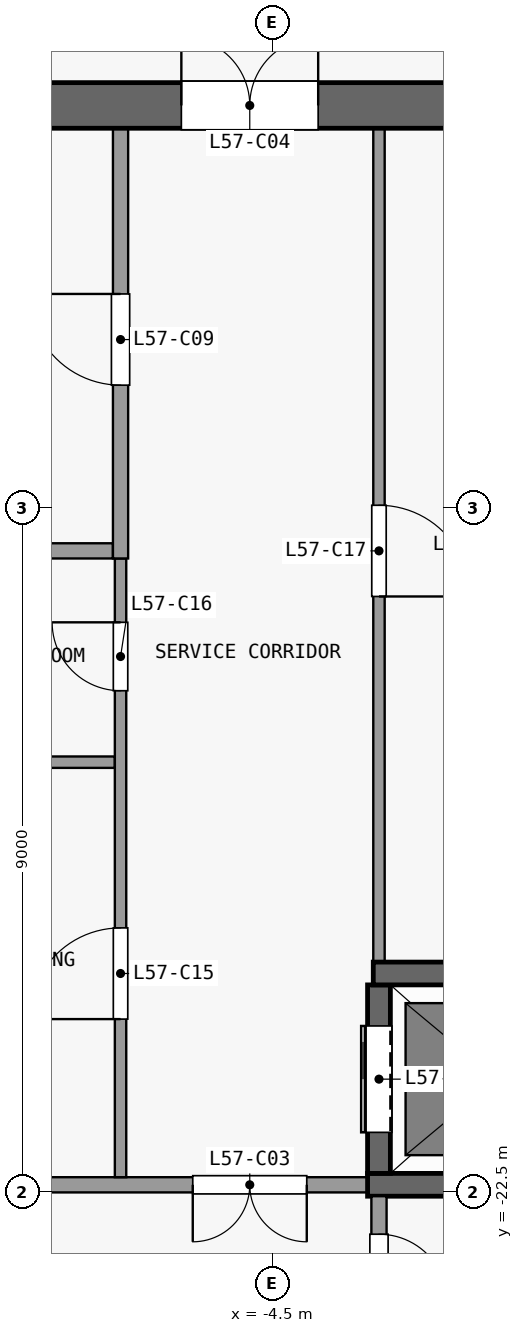
"""IFC4 building model, lengths in metres.
Left out: names, types, materials, properties, quantities, classifications, styles, units other than length and angle.
Written with IfcOpenShell. Run it as: python <this file> out.ifc"""

import sys

from ifc_helpers import new_model, si_unit, direction, frame, frame_2d, origin, place, context, subcontext, project, spatial, rectangle, extrude, element, fill, save


model = new_model("IFC4")
c1 = context("Model", 3, precision=1e-05, world=origin(), true_north=direction((0.0, 1.0)))
c2 = subcontext(c1, "Body", "Model", "MODEL_VIEW")
j1 = project(units=[si_unit("LENGTHUNIT", "METRE"), si_unit("PLANEANGLEUNIT", "RADIAN")], contexts=[c1])
p1 = place(None, origin())
s1 = spatial("IfcSite", under=j1, at=p1, CompositionType="ELEMENT")
p2 = place(p1, origin())
s2 = spatial("IfcBuilding", under=s1, at=p2, CompositionType="ELEMENT")
p3 = place(p2, frame((0.0, 0.0, 226.7)))
s3 = spatial("IfcBuildingStorey", under=s2, at=p3, CompositionType="ELEMENT", Elevation=226.7)
p4 = place(p3, frame((-13.2, -8.2, 0.0), z_axis=(0.0, 0.0, 1.0), x_axis=(1.0, 0.0, 0.0)))
e1 = element("IfcWall", 1, at=p4, inside=s3, PredefinedType="SHEAR", context=c2, shape_type="SweptSolid", body=[
    extrude(rectangle(XDim=26.4, YDim=0.6, at=frame_2d((13.2, 0.0))), origin(), (0.0, 0.0, 1.0), 3.3),
])
p5 = place(p4, frame((7.5, 0.0, 0.0)))
e2 = element("IfcOpeningElement", 2, at=p5, cuts=e1, PredefinedType="OPENING", context=c2, shape_type="SweptSolid", body=[
    extrude(rectangle(XDim=1.8, YDim=2.1, at=frame_2d((0.9, 1.05))), frame((0.0, 0.31, 0.0), z_axis=(0.0, -1.0, 0.0), x_axis=(1.0, 0.0, 0.0)), (0.0, 0.0, 1.0), 0.62),
])
p6 = place(p4, frame((17.1, 0.0, 0.0)))
e3 = element("IfcOpeningElement", 3, at=p6, cuts=e1, PredefinedType="OPENING", context=c2, shape_type="SweptSolid", body=[
    extrude(rectangle(XDim=1.8, YDim=2.1, at=frame_2d((0.9, 1.05))), frame((0.0, 0.31, 0.0), z_axis=(0.0, -1.0, 0.0), x_axis=(1.0, 0.0, 0.0)), (0.0, 0.0, 1.0), 0.62),
])
p7 = place(p4, frame((2.425, 0.0, 0.0)))
e4 = element("IfcOpeningElement", 4, at=p7, cuts=e1, PredefinedType="OPENING", context=c2, shape_type="SweptSolid", body=[
    extrude(rectangle(XDim=0.9, YDim=2.1, at=frame_2d((0.45, 1.05))), frame((0.0, 0.31, 0.0), z_axis=(0.0, -1.0, 0.0), x_axis=(1.0, 0.0, 0.0)), (0.0, 0.0, 1.0), 0.62),
])
p8 = place(p4, frame((23.075, 0.0, 0.0)))
e5 = element("IfcOpeningElement", 5, at=p8, cuts=e1, PredefinedType="OPENING", context=c2, shape_type="SweptSolid", body=[
    extrude(rectangle(XDim=0.9, YDim=2.1, at=frame_2d((0.45, 1.05))), frame((0.0, 0.31, 0.0), z_axis=(0.0, -1.0, 0.0), x_axis=(1.0, 0.0, 0.0)), (0.0, 0.0, 1.0), 0.62),
])
p9 = place(p3, frame((-3.25, -22.4, 0.0), z_axis=(0.0, 0.0, 1.0), x_axis=(-1.0, 0.0, 0.0)))
e6 = element("IfcWall", 6, at=p9, inside=s3, PredefinedType="PARTITIONING", context=c2, shape_type="SweptSolid", body=[
    extrude(rectangle(XDim=6.2, YDim=0.2, at=frame_2d((3.1, 0.0))), origin(), (0.0, 0.0, 1.0), 3.3),
])
p10 = place(p9, frame((0.8, 0.0, 0.0)))
e7 = element("IfcOpeningElement", 7, at=p10, cuts=e6, PredefinedType="OPENING", context=c2, shape_type="SweptSolid", body=[
    extrude(rectangle(XDim=1.5, YDim=2.1, at=frame_2d((0.75, 1.05))), frame((0.0, 0.11, 0.0), z_axis=(0.0, -1.0, 0.0), x_axis=(1.0, 0.0, 0.0)), (0.0, 0.0, 1.0), 0.22),
])
p11 = place(p3, frame((-3.25, -22.4, 0.0), z_axis=(0.0, 0.0, 1.0), x_axis=(1.0, 0.0, 0.0)))
e8 = element("IfcWall", 8, at=p11, inside=s3, PredefinedType="SHEAR", context=c2, shape_type="SweptSolid", body=[
    extrude(rectangle(XDim=6.5, YDim=0.3, at=frame_2d((3.25, 0.0))), origin(), (0.0, 0.0, 1.0), 3.3),
])
p12 = place(p3, frame((-3.175, -19.62, 0.0), z_axis=(0.0, 0.0, 1.0), x_axis=(1.0, 0.0, 0.0)))
e9 = element("IfcWall", 9, at=p12, inside=s3, PredefinedType="SHEAR", context=c2, shape_type="SweptSolid", body=[
    extrude(rectangle(XDim=3.025, YDim=0.3, at=frame_2d((1.513, 0.0))), origin(), (0.0, 0.0, 1.0), 3.3),
])
p13 = place(p3, frame((-9.5, -16.84, 0.0), z_axis=(0.0, 0.0, 1.0), x_axis=(1.0, 0.0, 0.0)))
e10 = element("IfcWall", 10, at=p13, inside=s3, PredefinedType="PARTITIONING", context=c2, shape_type="SweptSolid", body=[
    extrude(rectangle(XDim=2.925, YDim=0.15, at=frame_2d((1.462, 0.0))), origin(), (0.0, 0.0, 1.0), 3.3),
])
p14 = place(p3, frame((-9.5, -14.06, 0.0), z_axis=(0.0, 0.0, 1.0), x_axis=(1.0, 0.0, 0.0)))
e11 = element("IfcWall", 11, at=p14, inside=s3, PredefinedType="PARTITIONING", context=c2, shape_type="SweptSolid", body=[
    extrude(rectangle(XDim=2.9, YDim=0.2, at=frame_2d((1.45, 0.0))), origin(), (0.0, 0.0, 1.0), 3.3),
])
p15 = place(p3, frame((-6.5, -22.3, 0.0), z_axis=(0.0, 0.0, 1.0), x_axis=(0.0, 1.0, 0.0)))
e12 = element("IfcWall", 12, at=p15, inside=s3, PredefinedType="PARTITIONING", context=c2, shape_type="SweptSolid", body=[
    extrude(rectangle(XDim=8.14, YDim=0.15, at=frame_2d((4.07, 0.0))), origin(), (0.0, 0.0, 1.0), 3.3),
])
p16 = place(p15, frame((2.08, 0.0, 0.0)))
e13 = element("IfcOpeningElement", 13, at=p16, cuts=e12, PredefinedType="OPENING", context=c2, shape_type="SweptSolid", body=[
    extrude(rectangle(XDim=1.2, YDim=2.1, at=frame_2d((0.6, 1.05))), frame((0.0, 0.085, 0.0), z_axis=(0.0, -1.0, 0.0), x_axis=(1.0, 0.0, 0.0)), (0.0, 0.0, 1.0), 0.17),
])
p17 = place(p15, frame((6.4, 0.0, 0.0)))
e14 = element("IfcOpeningElement", 14, at=p17, cuts=e12, PredefinedType="OPENING", context=c2, shape_type="SweptSolid", body=[
    extrude(rectangle(XDim=0.9, YDim=2.1, at=frame_2d((0.45, 1.05))), frame((0.0, 0.085, 0.0), z_axis=(0.0, -1.0, 0.0), x_axis=(1.0, 0.0, 0.0)), (0.0, 0.0, 1.0), 0.17),
])
p18 = place(p3, frame((-6.5, -14.16, 0.0), z_axis=(0.0, 0.0, 1.0), x_axis=(0.0, 1.0, 0.0)))
e15 = element("IfcWall", 15, at=p18, inside=s3, PredefinedType="PARTITIONING", context=c2, shape_type="SweptSolid", body=[
    extrude(rectangle(XDim=5.66, YDim=0.2, at=frame_2d((2.83, 0.0))), origin(), (0.0, 0.0, 1.0), 3.3),
])
p19 = place(p18, frame((2.28, 0.0, 0.0)))
e16 = element("IfcOpeningElement", 16, at=p19, cuts=e15, PredefinedType="OPENING", context=c2, shape_type="SweptSolid", body=[
    extrude(rectangle(XDim=1.2, YDim=2.1, at=frame_2d((0.6, 1.05))), frame((0.0, 0.11, 0.0), z_axis=(0.0, -1.0, 0.0), x_axis=(1.0, 0.0, 0.0)), (0.0, 0.0, 1.0), 0.22),
])
p20 = place(p3, frame((-3.1, -22.55, 0.0), z_axis=(0.0, 0.0, 1.0), x_axis=(0.0, -1.0, 0.0)))
e17 = element("IfcWall", 17, at=p20, inside=s3, PredefinedType="PARTITIONING", context=c2, shape_type="SweptSolid", body=[
    extrude(rectangle(XDim=2.05, YDim=0.2, at=frame_2d((1.025, 0.0))), origin(), (0.0, 0.0, 1.0), 3.3),
])
p21 = place(p20, frame((0.5, 0.0, 0.0)))
e18 = element("IfcOpeningElement", 18, at=p21, cuts=e17, PredefinedType="OPENING", context=c2, shape_type="SweptSolid", body=[
    extrude(rectangle(XDim=0.9, YDim=2.1, at=frame_2d((0.45, 1.05))), frame((0.0, 0.11, 0.0), z_axis=(0.0, -1.0, 0.0), x_axis=(1.0, 0.0, 0.0)), (0.0, 0.0, 1.0), 0.22),
])
p22 = place(p3, frame((-3.1, -22.25, 0.0), z_axis=(0.0, 0.0, 1.0), x_axis=(0.0, 1.0, 0.0)))
e19 = element("IfcWall", 19, at=p22, inside=s3, PredefinedType="SHEAR", context=c2, shape_type="SweptSolid", body=[
    extrude(rectangle(XDim=2.48, YDim=0.3, at=frame_2d((1.24, 0.0))), origin(), (0.0, 0.0, 1.0), 3.3),
])
p23 = place(p22, frame((0.54, 0.0, 0.0)))
e20 = element("IfcOpeningElement", 20, at=p23, cuts=e19, PredefinedType="OPENING", context=c2, shape_type="SweptSolid", body=[
    extrude(rectangle(XDim=1.4, YDim=2.1, at=frame_2d((0.7, 1.05))), frame((0.0, 0.16, 0.0), z_axis=(0.0, -1.0, 0.0), x_axis=(1.0, 0.0, 0.0)), (0.0, 0.0, 1.0), 0.32),
])
p24 = place(p3, frame((-3.1, -8.5, 0.0), z_axis=(0.0, 0.0, 1.0), x_axis=(0.0, -1.0, 0.0)))
e21 = element("IfcWall", 21, at=p24, inside=s3, PredefinedType="PARTITIONING", context=c2, shape_type="SweptSolid", body=[
    extrude(rectangle(XDim=10.97, YDim=0.15, at=frame_2d((5.485, 0.0))), origin(), (0.0, 0.0, 1.0), 3.3),
])
p25 = place(p24, frame((4.96, 0.0, 0.0)))
e22 = element("IfcOpeningElement", 22, at=p25, cuts=e21, PredefinedType="OPENING", context=c2, shape_type="SweptSolid", body=[
    extrude(rectangle(XDim=1.2, YDim=2.1, at=frame_2d((0.6, 1.05))), frame((0.0, 0.085, 0.0), z_axis=(0.0, -1.0, 0.0), x_axis=(1.0, 0.0, 0.0)), (0.0, 0.0, 1.0), 0.17),
])
p26 = place(p23, origin())
e23 = element("IfcDoor", 23, at=p26, inside=s3, OperationType="DOUBLE_DOOR_SLIDING", PredefinedType="DOOR", context=c2, shape_type="SweptSolid", body=[
    extrude(rectangle(XDim=1.4, YDim=2.1, at=frame_2d((0.7, 1.05))), frame((0.0, 0.025, 0.0), z_axis=(0.0, -1.0, 0.0), x_axis=(1.0, 0.0, 0.0)), (0.0, 0.0, 1.0), 0.05),
])
fill(e20, e23)
p27 = place(p10, origin())
e24 = element("IfcDoor", 24, at=p27, inside=s3, OperationType="DOUBLE_DOOR_SINGLE_SWING", PredefinedType="DOOR", context=c2, shape_type="SweptSolid", body=[
    extrude(rectangle(XDim=1.5, YDim=2.1, at=frame_2d((0.75, 1.05))), frame((0.0, 0.025, 0.0), z_axis=(0.0, -1.0, 0.0), x_axis=(1.0, 0.0, 0.0)), (0.0, 0.0, 1.0), 0.05),
])
fill(e7, e24)
p28 = place(p5, origin())
e25 = element("IfcDoor", 25, at=p28, inside=s3, OperationType="DOUBLE_DOOR_SINGLE_SWING", PredefinedType="DOOR", context=c2, shape_type="SweptSolid", body=[
    extrude(rectangle(XDim=1.8, YDim=2.1, at=frame_2d((0.9, 1.05))), frame((0.0, 0.025, 0.0), z_axis=(0.0, -1.0, 0.0), x_axis=(1.0, 0.0, 0.0)), (0.0, 0.0, 1.0), 0.05),
])
fill(e2, e25)
p29 = place(p19, origin())
e26 = element("IfcDoor", 26, at=p29, inside=s3, OperationType="SINGLE_SWING_RIGHT", PredefinedType="DOOR", context=c2, shape_type="SweptSolid", body=[
    extrude(rectangle(XDim=1.2, YDim=2.1, at=frame_2d((0.6, 1.05))), frame((0.0, 0.025, 0.0), z_axis=(0.0, -1.0, 0.0), x_axis=(1.0, 0.0, 0.0)), (0.0, 0.0, 1.0), 0.05),
])
fill(e16, e26)
p30 = place(p21, origin())
e27 = element("IfcDoor", 27, at=p30, inside=s3, OperationType="SINGLE_SWING_RIGHT", PredefinedType="DOOR", context=c2, shape_type="SweptSolid", body=[
    extrude(rectangle(XDim=0.9, YDim=2.1, at=frame_2d((0.45, 1.05))), frame((0.0, 0.025, 0.0), z_axis=(0.0, -1.0, 0.0), x_axis=(1.0, 0.0, 0.0)), (0.0, 0.0, 1.0), 0.05),
])
fill(e18, e27)
p31 = place(p16, origin())
e28 = element("IfcDoor", 28, at=p31, inside=s3, OperationType="SINGLE_SWING_LEFT", PredefinedType="DOOR", context=c2, shape_type="SweptSolid", body=[
    extrude(rectangle(XDim=1.2, YDim=2.1, at=frame_2d((0.6, 1.05))), frame((0.0, 0.025, 0.0), z_axis=(0.0, -1.0, 0.0), x_axis=(1.0, 0.0, 0.0)), (0.0, 0.0, 1.0), 0.05),
])
fill(e13, e28)
p32 = place(p17, origin())
e29 = element("IfcDoor", 29, at=p32, inside=s3, OperationType="SINGLE_SWING_RIGHT", PredefinedType="DOOR", context=c2, shape_type="SweptSolid", body=[
    extrude(rectangle(XDim=0.9, YDim=2.1, at=frame_2d((0.45, 1.05))), frame((0.0, 0.025, 0.0), z_axis=(0.0, -1.0, 0.0), x_axis=(1.0, 0.0, 0.0)), (0.0, 0.0, 1.0), 0.05),
])
fill(e14, e29)
p33 = place(p25, origin())
e30 = element("IfcDoor", 30, at=p33, inside=s3, OperationType="SINGLE_SWING_RIGHT", PredefinedType="DOOR", context=c2, shape_type="SweptSolid", body=[
    extrude(rectangle(XDim=1.2, YDim=2.1, at=frame_2d((0.6, 1.05))), frame((0.0, 0.025, 0.0), z_axis=(0.0, -1.0, 0.0), x_axis=(1.0, 0.0, 0.0)), (0.0, 0.0, 1.0), 0.05),
])
fill(e22, e30)
save(model, sys.argv[1])
